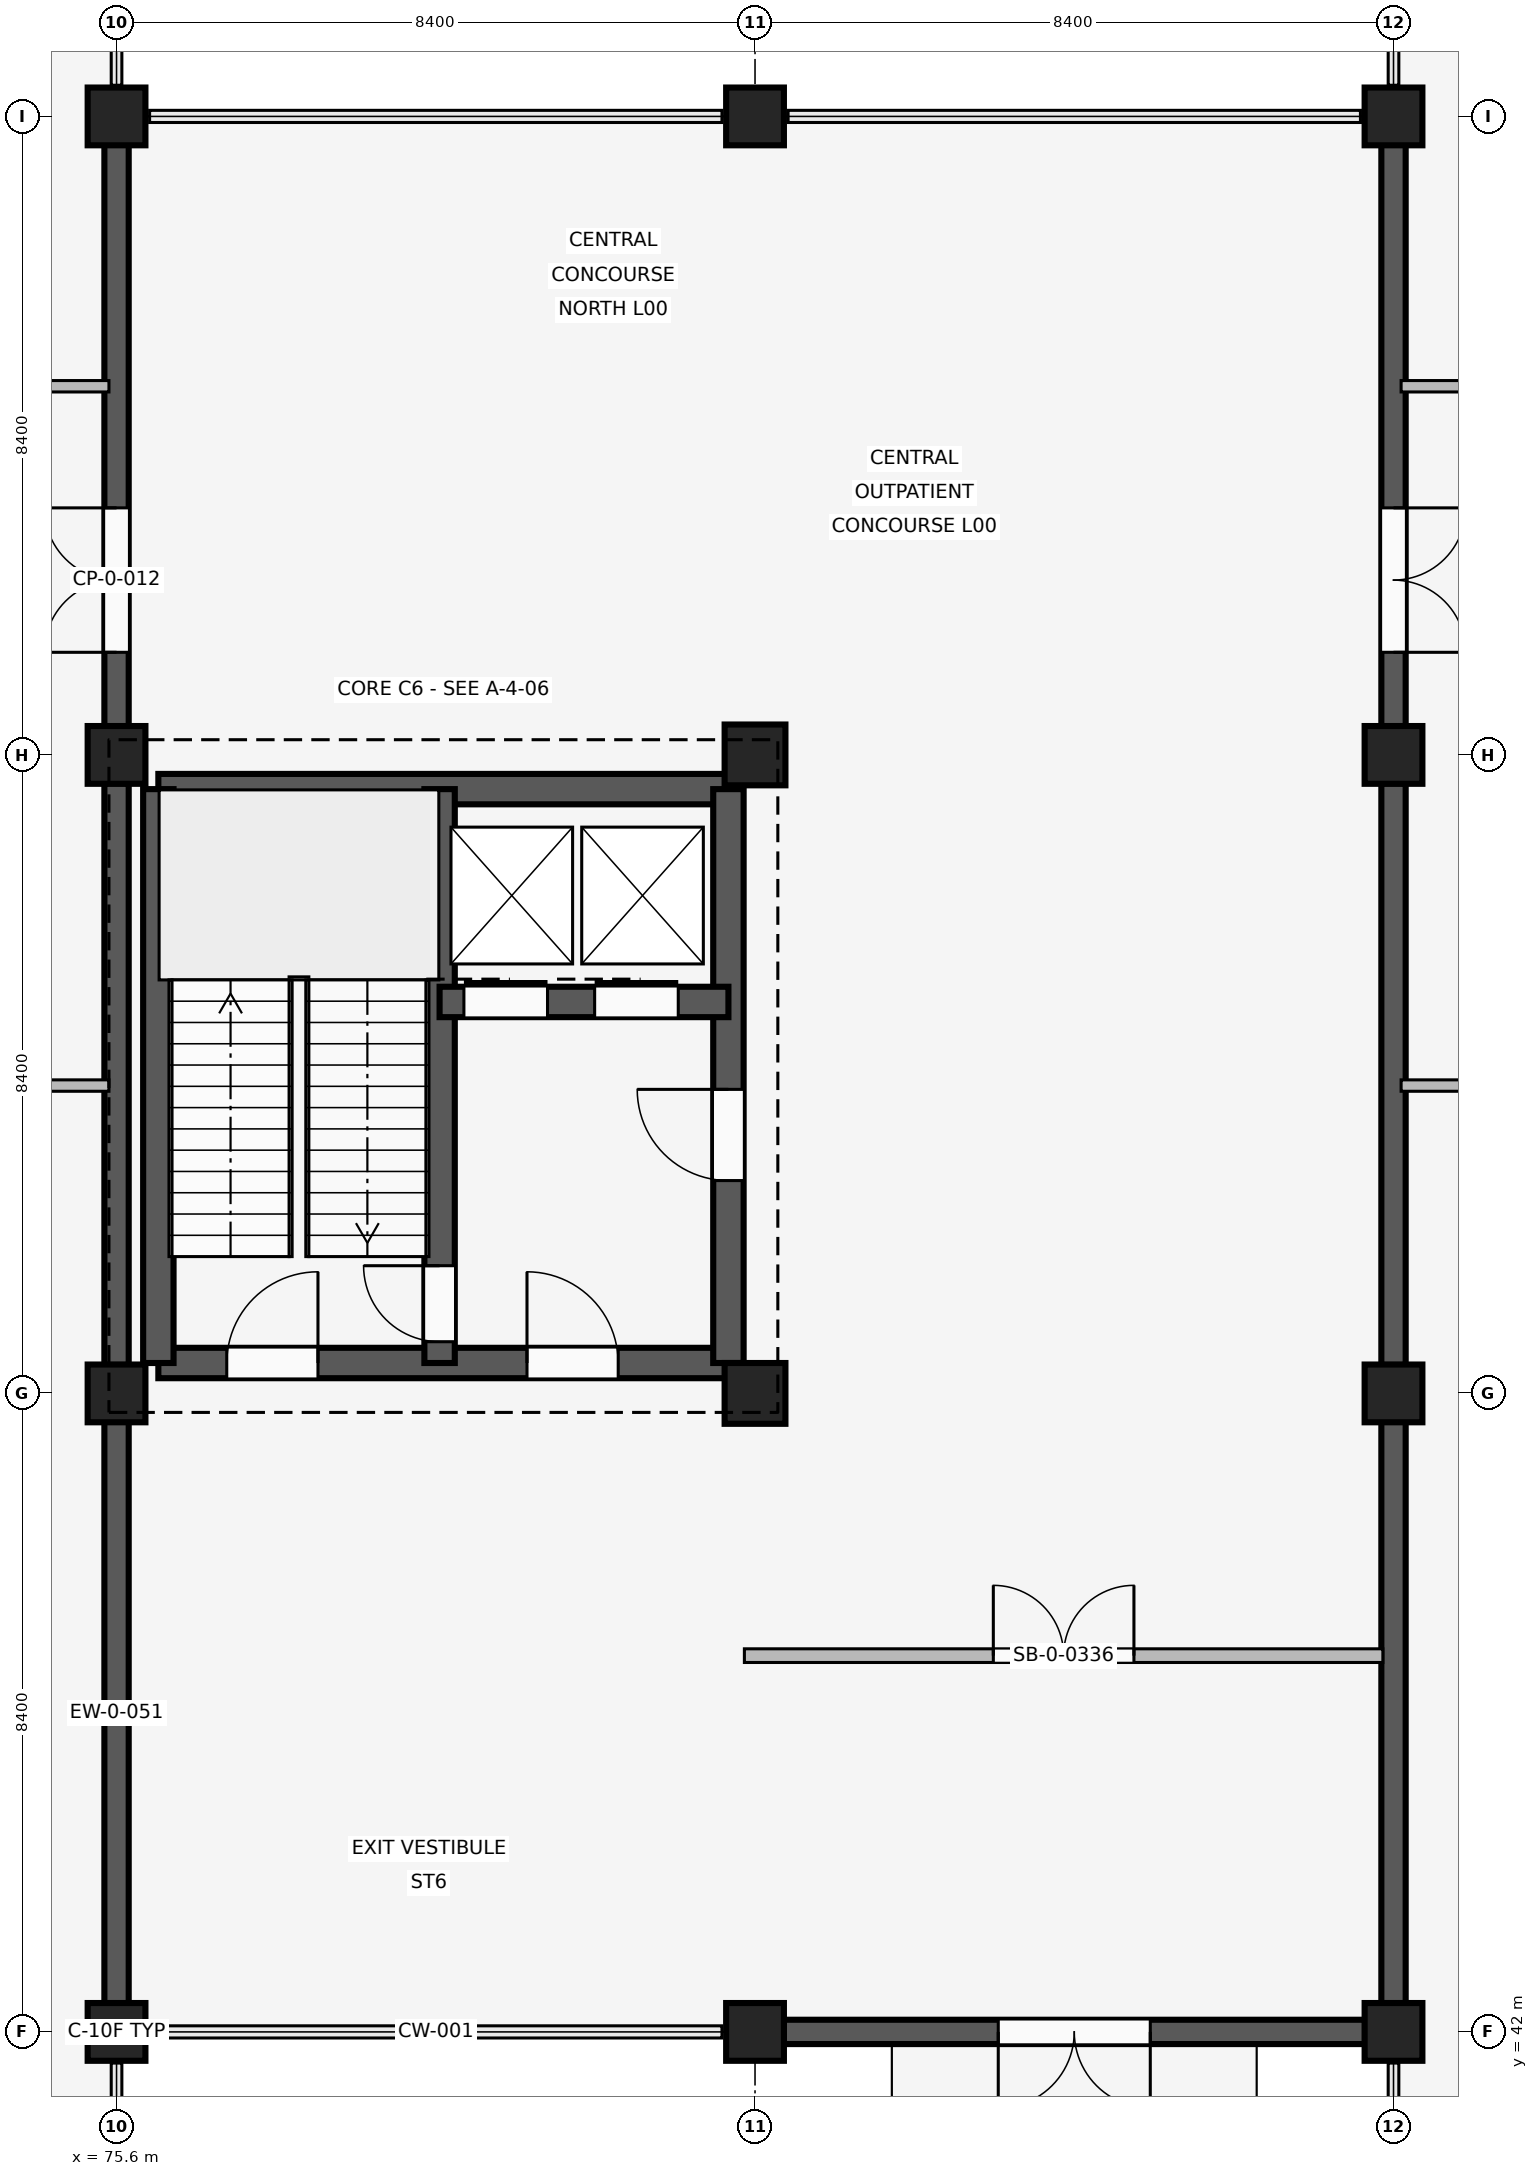
"""IFC4 building model, lengths in metres.
Left out: names, types, materials, properties, quantities, classifications, styles, units other than length and angle.
Written with IfcOpenShell. Run it as: python <this file> out.ifc"""

import sys

from ifc_helpers import new_model, si_unit, direction, frame, frame_2d, origin, origin_2d, place, context, subcontext, project, spatial, rectangle, extrude, element, fill, save


model = new_model("IFC4")
c1 = context("Model", 3, precision=1e-05, world=origin(), true_north=direction((0.0, 1.0)))
c2 = subcontext(c1, "Body", "Model", "MODEL_VIEW")
j1 = project(units=[si_unit("LENGTHUNIT", "METRE"), si_unit("PLANEANGLEUNIT", "RADIAN")], contexts=[c1])
p1 = place(None, origin())
s1 = spatial("IfcSite", under=j1, at=p1, CompositionType="ELEMENT")
p2 = place(p1, origin())
s2 = spatial("IfcBuilding", under=s1, at=p2, CompositionType="ELEMENT")
p3 = place(p2, origin())
s3 = spatial("IfcBuildingStorey", under=s2, at=p3, CompositionType="ELEMENT", Elevation=0.0)
for number, where, z_axis, x_axis in (
    (1, (75.6, 42.0, 0.0), (0.0, 0.0, 1.0), (1.0, 0.0, 0.0)),
    (2, (75.6, 50.4, 0.0), (0.0, 0.0, 1.0), (1.0, 0.0, 0.0)),
    (3, (75.6, 58.8, 0.0), (0.0, 0.0, 1.0), (1.0, 0.0, 0.0)),
    (4, (75.6, 67.2, 0.0), (0.0, 0.0, 1.0), (1.0, 0.0, 0.0)),
    (5, (84.0, 42.0, 0.0), (0.0, 0.0, 1.0), (1.0, 0.0, 0.0)),
):
    element("IfcColumn", number, at=place(p3, frame(where, z_axis=z_axis, x_axis=x_axis)), inside=s3, PredefinedType="COLUMN", context=c2, shape_type="SweptSolid", body=[
        extrude(rectangle(XDim=0.76, YDim=0.76, at=origin_2d()), origin(), (0.0, 0.0, 1.0), 4.8),
    ])
for number, where, z_axis, x_axis in (
    (6, (84.0, 50.4, 0.0), (0.0, 0.0, 1.0), (1.0, 0.0, 0.0)),
    (7, (84.0, 58.8, 0.0), (0.0, 0.0, 1.0), (1.0, 0.0, 0.0)),
):
    element("IfcColumn", number, at=place(p3, frame(where, z_axis=z_axis, x_axis=x_axis)), inside=s3, PredefinedType="COLUMN", context=c2, shape_type="SweptSolid", body=[
        extrude(rectangle(XDim=0.8, YDim=0.8, at=origin_2d()), origin(), (0.0, 0.0, 1.0), 4.8),
    ])
for number, where, z_axis, x_axis in (
    (8, (84.0, 67.2, 0.0), (0.0, 0.0, 1.0), (1.0, 0.0, 0.0)),
    (9, (92.4, 42.0, 0.0), (0.0, 0.0, 1.0), (1.0, 0.0, 0.0)),
    (10, (92.4, 50.4, 0.0), (0.0, 0.0, 1.0), (1.0, 0.0, 0.0)),
    (11, (92.4, 58.8, 0.0), (0.0, 0.0, 1.0), (1.0, 0.0, 0.0)),
    (12, (92.4, 67.2, 0.0), (0.0, 0.0, 1.0), (1.0, 0.0, 0.0)),
):
    element("IfcColumn", number, at=place(p3, frame(where, z_axis=z_axis, x_axis=x_axis)), inside=s3, PredefinedType="COLUMN", context=c2, shape_type="SweptSolid", body=[
        extrude(rectangle(XDim=0.76, YDim=0.76, at=origin_2d()), origin(), (0.0, 0.0, 1.0), 4.8),
    ])
p4 = place(p3, frame((75.6, 42.375, 0.0), z_axis=(0.0, 0.0, 1.0), x_axis=(0.0, 1.0, 0.0)))
e13 = element("IfcWall", 13, at=p4, inside=s3, PredefinedType="SOLIDWALL", context=c2, shape_type="SweptSolid", body=[
    extrude(rectangle(XDim=7.65, YDim=0.32, at=frame_2d((3.825, 0.0))), origin(), (0.0, 0.0, 1.0), 3.82),
])
p5 = place(p3, frame((75.6, 50.775, 0.0), z_axis=(0.0, 0.0, 1.0), x_axis=(0.0, 1.0, 0.0)))
e14 = element("IfcWall", 14, at=p5, inside=s3, PredefinedType="SOLIDWALL", context=c2, shape_type="SweptSolid", body=[
    extrude(rectangle(XDim=7.65, YDim=0.32, at=frame_2d((3.825, 0.0))), origin(), (0.0, 0.0, 1.0), 3.82),
])
p6 = place(p3, frame((75.6, 59.175, 0.0), z_axis=(0.0, 0.0, 1.0), x_axis=(0.0, 1.0, 0.0)))
e15 = element("IfcWall", 15, at=p6, inside=s3, PredefinedType="SOLIDWALL", context=c2, shape_type="SweptSolid", body=[
    extrude(rectangle(XDim=7.65, YDim=0.32, at=frame_2d((3.825, 0.0))), origin(), (0.0, 0.0, 1.0), 3.82),
])
p7 = place(p6, frame((0.975, 0.0, 0.0)))
e16 = element("IfcOpeningElement", 16, at=p7, cuts=e15, PredefinedType="OPENING", context=c2, shape_type="SweptSolid", body=[
    extrude(rectangle(XDim=1.9, YDim=2.4, at=frame_2d((0.95, 1.2))), frame((0.0, 0.17, 0.0), z_axis=(0.0, -1.0, 0.0), x_axis=(1.0, 0.0, 0.0)), (0.0, 0.0, 1.0), 0.34),
])
p8 = place(p3, frame((92.025, 42.0, 0.0), z_axis=(0.0, 0.0, 1.0), x_axis=(-1.0, 0.0, 0.0)))
e17 = element("IfcWall", 17, at=p8, inside=s3, PredefinedType="SOLIDWALL", context=c2, shape_type="SweptSolid", body=[
    extrude(rectangle(XDim=7.65, YDim=0.32, at=frame_2d((3.825, 0.0))), origin(), (0.0, 0.0, 1.0), 3.82),
])
p9 = place(p8, frame((2.825, 0.0, 0.0)))
e18 = element("IfcOpeningElement", 18, at=p9, cuts=e17, PredefinedType="OPENING", context=c2, shape_type="SweptSolid", body=[
    extrude(rectangle(XDim=2.0, YDim=2.4, at=frame_2d((1.0, 1.2))), frame((0.0, 0.17, 0.0), z_axis=(0.0, -1.0, 0.0), x_axis=(1.0, 0.0, 0.0)), (0.0, 0.0, 1.0), 0.34),
])
p10 = place(p3, frame((92.4, 50.025, 0.0), z_axis=(0.0, 0.0, 1.0), x_axis=(0.0, -1.0, 0.0)))
e19 = element("IfcWall", 19, at=p10, inside=s3, PredefinedType="SOLIDWALL", context=c2, shape_type="SweptSolid", body=[
    extrude(rectangle(XDim=7.65, YDim=0.32, at=frame_2d((3.825, 0.0))), origin(), (0.0, 0.0, 1.0), 3.82),
])
p11 = place(p3, frame((92.4, 58.425, 0.0), z_axis=(0.0, 0.0, 1.0), x_axis=(0.0, -1.0, 0.0)))
e20 = element("IfcWall", 20, at=p11, inside=s3, PredefinedType="SOLIDWALL", context=c2, shape_type="SweptSolid", body=[
    extrude(rectangle(XDim=7.65, YDim=0.32, at=frame_2d((3.825, 0.0))), origin(), (0.0, 0.0, 1.0), 3.82),
])
p12 = place(p3, frame((92.4, 66.825, 0.0), z_axis=(0.0, 0.0, 1.0), x_axis=(0.0, -1.0, 0.0)))
e21 = element("IfcWall", 21, at=p12, inside=s3, PredefinedType="SOLIDWALL", context=c2, shape_type="SweptSolid", body=[
    extrude(rectangle(XDim=7.65, YDim=0.32, at=frame_2d((3.825, 0.0))), origin(), (0.0, 0.0, 1.0), 3.82),
])
p13 = place(p12, frame((4.775, 0.0, 0.0)))
e22 = element("IfcOpeningElement", 22, at=p13, cuts=e21, PredefinedType="OPENING", context=c2, shape_type="SweptSolid", body=[
    extrude(rectangle(XDim=1.9, YDim=2.4, at=frame_2d((0.95, 1.2))), frame((0.0, 0.17, 0.0), z_axis=(0.0, -1.0, 0.0), x_axis=(1.0, 0.0, 0.0)), (0.0, 0.0, 1.0), 0.34),
])
p14 = place(p3, frame((76.15, 50.8, 0.0), z_axis=(0.0, 0.0, 1.0), x_axis=(1.0, 0.0, 0.0)))
e23 = element("IfcWall", 23, at=p14, inside=s3, PredefinedType="SHEAR", context=c2, shape_type="SweptSolid", body=[
    extrude(rectangle(XDim=7.5, YDim=0.4, at=frame_2d((3.75, 0.0))), origin(), (0.0, 0.0, 1.0), 4.52),
])
p15 = place(p14, frame((4.85, 0.0, 0.0)))
e24 = element("IfcOpeningElement", 24, at=p15, cuts=e23, PredefinedType="OPENING", context=c2, shape_type="SweptSolid", body=[
    extrude(rectangle(XDim=1.2, YDim=2.2, at=frame_2d((0.6, 1.1))), frame((0.0, 0.21, 0.0), z_axis=(0.0, -1.0, 0.0), x_axis=(1.0, 0.0, 0.0)), (0.0, 0.0, 1.0), 0.42),
])
p16 = place(p14, frame((0.9, 0.0, 0.0)))
e25 = element("IfcOpeningElement", 25, at=p16, cuts=e23, PredefinedType="OPENING", context=c2, shape_type="SweptSolid", body=[
    extrude(rectangle(XDim=1.2, YDim=2.2, at=frame_2d((0.6, 1.1))), frame((0.0, 0.21, 0.0), z_axis=(0.0, -1.0, 0.0), x_axis=(1.0, 0.0, 0.0)), (0.0, 0.0, 1.0), 0.42),
])
p17 = place(p3, frame((76.15, 58.35, 0.0), z_axis=(0.0, 0.0, 1.0), x_axis=(1.0, 0.0, 0.0)))
e26 = element("IfcWall", 26, at=p17, inside=s3, PredefinedType="SHEAR", context=c2, shape_type="SweptSolid", body=[
    extrude(rectangle(XDim=7.5, YDim=0.4, at=frame_2d((3.75, 0.0))), origin(), (0.0, 0.0, 1.0), 4.52),
])
p18 = place(p3, frame((76.15, 50.8, 0.0), z_axis=(0.0, 0.0, 1.0), x_axis=(0.0, 1.0, 0.0)))
e27 = element("IfcWall", 27, at=p18, inside=s3, PredefinedType="SHEAR", context=c2, shape_type="SweptSolid", body=[
    extrude(rectangle(XDim=7.55, YDim=0.4, at=frame_2d((3.775, 0.0))), origin(), (0.0, 0.0, 1.0), 4.52),
])
p19 = place(p3, frame((83.65, 50.8, 0.0), z_axis=(0.0, 0.0, 1.0), x_axis=(0.0, 1.0, 0.0)))
e28 = element("IfcWall", 28, at=p19, inside=s3, PredefinedType="SHEAR", context=c2, shape_type="SweptSolid", body=[
    extrude(rectangle(XDim=7.55, YDim=0.4, at=frame_2d((3.775, 0.0))), origin(), (0.0, 0.0, 1.0), 4.52),
])
p20 = place(p19, frame((2.4, 0.0, 0.0)))
e29 = element("IfcOpeningElement", 29, at=p20, cuts=e28, PredefinedType="OPENING", context=c2, shape_type="SweptSolid", body=[
    extrude(rectangle(XDim=1.2, YDim=2.2, at=frame_2d((0.6, 1.1))), frame((0.0, 0.21, 0.0), z_axis=(0.0, -1.0, 0.0), x_axis=(1.0, 0.0, 0.0)), (0.0, 0.0, 1.0), 0.42),
])
p21 = place(p3, frame((79.85, 50.8, 0.0), z_axis=(0.0, 0.0, 1.0), x_axis=(0.0, 1.0, 0.0)))
e30 = element("IfcWall", 30, at=p21, inside=s3, PredefinedType="SHEAR", context=c2, shape_type="SweptSolid", body=[
    extrude(rectangle(XDim=7.55, YDim=0.4, at=frame_2d((3.775, 0.0))), origin(), (0.0, 0.0, 1.0), 4.52),
])
p22 = place(p21, frame((0.28, 0.0, 0.0)))
e31 = element("IfcOpeningElement", 31, at=p22, cuts=e30, PredefinedType="OPENING", context=c2, shape_type="SweptSolid", body=[
    extrude(rectangle(XDim=1.0, YDim=2.15, at=frame_2d((0.5, 1.075))), frame((0.0, 0.21, 0.0), z_axis=(0.0, -1.0, 0.0), x_axis=(1.0, 0.0, 0.0)), (0.0, 0.0, 1.0), 0.42),
])
p23 = place(p3, frame((79.85, 55.55, 0.0), z_axis=(0.0, 0.0, 1.0), x_axis=(1.0, 0.0, 0.0)))
e32 = element("IfcWall", 32, at=p23, inside=s3, PredefinedType="SHEAR", context=c2, shape_type="SweptSolid", body=[
    extrude(rectangle(XDim=3.8, YDim=0.4, at=frame_2d((1.9, 0.0))), origin(), (0.0, 0.0, 1.0), 4.52),
])
p24 = place(p23, frame((0.32, 0.0, 0.0)))
e33 = element("IfcOpeningElement", 33, at=p24, cuts=e32, PredefinedType="OPENING", context=c2, shape_type="SweptSolid", body=[
    extrude(rectangle(XDim=1.1, YDim=2.15, at=frame_2d((0.55, 1.075))), frame((0.0, 0.21, 0.0), z_axis=(0.0, -1.0, 0.0), x_axis=(1.0, 0.0, 0.0)), (0.0, 0.0, 1.0), 0.42),
])
p25 = place(p23, frame((2.04, 0.0, 0.0)))
e34 = element("IfcOpeningElement", 34, at=p25, cuts=e32, PredefinedType="OPENING", context=c2, shape_type="SweptSolid", body=[
    extrude(rectangle(XDim=1.1, YDim=2.15, at=frame_2d((0.55, 1.075))), frame((0.0, 0.21, 0.0), z_axis=(0.0, -1.0, 0.0), x_axis=(1.0, 0.0, 0.0)), (0.0, 0.0, 1.0), 0.42),
])
p26 = place(p3, frame((83.86, 46.95, 0.0), z_axis=(0.0, 0.0, 1.0), x_axis=(1.0, 0.0, 0.0)))
e35 = element("IfcWall", 35, at=p26, inside=s3, PredefinedType="PARTITIONING", context=c2, shape_type="SweptSolid", body=[
    extrude(rectangle(XDim=8.4, YDim=0.18, at=frame_2d((4.2, 0.0))), origin(), (0.0, 0.0, 1.0), 3.8),
])
p27 = place(p26, frame((3.275, 0.0, 0.0)))
e36 = element("IfcOpeningElement", 36, at=p27, cuts=e35, PredefinedType="OPENING", context=c2, shape_type="SweptSolid", body=[
    extrude(rectangle(XDim=1.85, YDim=2.3, at=frame_2d((0.925, 1.15))), frame((0.0, 0.1, 0.0), z_axis=(0.0, -1.0, 0.0), x_axis=(1.0, 0.0, 0.0)), (0.0, 0.0, 1.0), 0.2),
])
p28 = place(p3, frame((46.9, 54.45, 0.0), z_axis=(0.0, 0.0, 1.0), x_axis=(1.0, 0.0, 0.0)))
e37 = element("IfcWall", 37, at=p28, inside=s3, PredefinedType="PARTITIONING", context=c2, shape_type="SweptSolid", body=[
    extrude(rectangle(XDim=28.6, YDim=0.15, at=frame_2d((14.3, 0.0))), origin(), (0.0, 0.0, 1.0), 4.09),
])
p29 = place(p28, frame((2.6, 0.0, 0.0)))
e38 = element("IfcOpeningElement", 38, at=p29, cuts=e37, PredefinedType="OPENING", context=c2, shape_type="SweptSolid", body=[
    extrude(rectangle(XDim=1.0, YDim=2.15, at=frame_2d((0.5, 1.075))), frame((0.0, 0.085, 0.0), z_axis=(0.0, -1.0, 0.0), x_axis=(1.0, 0.0, 0.0)), (0.0, 0.0, 1.0), 0.17),
])
p30 = place(p3, frame((46.9, 63.65, 0.0), z_axis=(0.0, 0.0, 1.0), x_axis=(1.0, 0.0, 0.0)))
e39 = element("IfcWall", 39, at=p30, inside=s3, PredefinedType="PARTITIONING", context=c2, shape_type="SweptSolid", body=[
    extrude(rectangle(XDim=28.6, YDim=0.15, at=frame_2d((14.3, 0.0))), origin(), (0.0, 0.0, 1.0), 4.09),
])
p31 = place(p30, frame((2.6, 0.0, 0.0)))
e40 = element("IfcOpeningElement", 40, at=p31, cuts=e39, PredefinedType="OPENING", context=c2, shape_type="SweptSolid", body=[
    extrude(rectangle(XDim=1.05, YDim=2.2, at=frame_2d((0.525, 1.1))), frame((0.0, 0.085, 0.0), z_axis=(0.0, -1.0, 0.0), x_axis=(1.0, 0.0, 0.0)), (0.0, 0.0, 1.0), 0.17),
])
p32 = place(p3, frame((92.5, 54.45, 0.0), z_axis=(0.0, 0.0, 1.0), x_axis=(1.0, 0.0, 0.0)))
e41 = element("IfcWall", 41, at=p32, inside=s3, PredefinedType="PARTITIONING", context=c2, shape_type="SweptSolid", body=[
    extrude(rectangle(XDim=28.6, YDim=0.15, at=frame_2d((14.3, 0.0))), origin(), (0.0, 0.0, 1.0), 4.09),
])
p33 = place(p32, frame((2.6, 0.0, 0.0)))
e42 = element("IfcOpeningElement", 42, at=p33, cuts=e41, PredefinedType="OPENING", context=c2, shape_type="SweptSolid", body=[
    extrude(rectangle(XDim=1.0, YDim=2.15, at=frame_2d((0.5, 1.075))), frame((0.0, 0.085, 0.0), z_axis=(0.0, -1.0, 0.0), x_axis=(1.0, 0.0, 0.0)), (0.0, 0.0, 1.0), 0.17),
])
p34 = place(p3, frame((92.5, 63.65, 0.0), z_axis=(0.0, 0.0, 1.0), x_axis=(1.0, 0.0, 0.0)))
e43 = element("IfcWall", 43, at=p34, inside=s3, PredefinedType="PARTITIONING", context=c2, shape_type="SweptSolid", body=[
    extrude(rectangle(XDim=28.6, YDim=0.15, at=frame_2d((14.3, 0.0))), origin(), (0.0, 0.0, 1.0), 4.09),
])
p35 = place(p34, frame((2.6, 0.0, 0.0)))
e44 = element("IfcOpeningElement", 44, at=p35, cuts=e43, PredefinedType="OPENING", context=c2, shape_type="SweptSolid", body=[
    extrude(rectangle(XDim=1.05, YDim=2.2, at=frame_2d((0.525, 1.1))), frame((0.0, 0.085, 0.0), z_axis=(0.0, -1.0, 0.0), x_axis=(1.0, 0.0, 0.0)), (0.0, 0.0, 1.0), 0.17),
])
p36 = place(p7, origin())
e45 = element("IfcDoor", 45, at=p36, inside=s3, OperationType="DOUBLE_SWING_LEFT", PredefinedType="DOOR", context=c2, shape_type="SweptSolid", body=[
    extrude(rectangle(XDim=1.9, YDim=2.4, at=frame_2d((0.95, 1.2))), frame((0.0, 0.025, 0.0), z_axis=(0.0, -1.0, 0.0), x_axis=(1.0, 0.0, 0.0)), (0.0, 0.0, 1.0), 0.05),
])
fill(e16, e45)
p37 = place(p9, origin())
e46 = element("IfcDoor", 46, at=p37, inside=s3, OperationType="DOUBLE_SWING_LEFT", PredefinedType="DOOR", context=c2, shape_type="SweptSolid", body=[
    extrude(rectangle(XDim=2.0, YDim=2.4, at=frame_2d((1.0, 1.2))), frame((0.0, 0.025, 0.0), z_axis=(0.0, -1.0, 0.0), x_axis=(1.0, 0.0, 0.0)), (0.0, 0.0, 1.0), 0.05),
])
fill(e18, e46)
p38 = place(p13, origin())
e47 = element("IfcDoor", 47, at=p38, inside=s3, OperationType="DOUBLE_SWING_LEFT", PredefinedType="DOOR", context=c2, shape_type="SweptSolid", body=[
    extrude(rectangle(XDim=1.9, YDim=2.4, at=frame_2d((0.95, 1.2))), frame((0.0, 0.025, 0.0), z_axis=(0.0, -1.0, 0.0), x_axis=(1.0, 0.0, 0.0)), (0.0, 0.0, 1.0), 0.05),
])
fill(e22, e47)
p39 = place(p20, origin())
e48 = element("IfcDoor", 48, at=p39, inside=s3, OperationType="SINGLE_SWING_RIGHT", PredefinedType="DOOR", context=c2, shape_type="SweptSolid", body=[
    extrude(rectangle(XDim=1.2, YDim=2.2, at=frame_2d((0.6, 1.1))), frame((0.0, 0.025, 0.0), z_axis=(0.0, -1.0, 0.0), x_axis=(1.0, 0.0, 0.0)), (0.0, 0.0, 1.0), 0.05),
])
fill(e29, e48)
p40 = place(p15, origin())
e49 = element("IfcDoor", 49, at=p40, inside=s3, OperationType="SINGLE_SWING_LEFT", PredefinedType="DOOR", context=c2, shape_type="SweptSolid", body=[
    extrude(rectangle(XDim=1.2, YDim=2.2, at=frame_2d((0.6, 1.1))), frame((0.0, 0.025, 0.0), z_axis=(0.0, -1.0, 0.0), x_axis=(1.0, 0.0, 0.0)), (0.0, 0.0, 1.0), 0.05),
])
fill(e24, e49)
p41 = place(p22, origin())
e50 = element("IfcDoor", 50, at=p41, inside=s3, OperationType="SINGLE_SWING_RIGHT", PredefinedType="DOOR", context=c2, shape_type="SweptSolid", body=[
    extrude(rectangle(XDim=1.0, YDim=2.15, at=frame_2d((0.5, 1.075))), frame((0.0, 0.025, 0.0), z_axis=(0.0, -1.0, 0.0), x_axis=(1.0, 0.0, 0.0)), (0.0, 0.0, 1.0), 0.05),
])
fill(e31, e50)
p42 = place(p16, origin())
e51 = element("IfcDoor", 51, at=p42, inside=s3, OperationType="SINGLE_SWING_RIGHT", PredefinedType="DOOR", context=c2, shape_type="SweptSolid", body=[
    extrude(rectangle(XDim=1.2, YDim=2.2, at=frame_2d((0.6, 1.1))), frame((0.0, 0.025, 0.0), z_axis=(0.0, -1.0, 0.0), x_axis=(1.0, 0.0, 0.0)), (0.0, 0.0, 1.0), 0.05),
])
fill(e25, e51)
p43 = place(p24, origin())
e52 = element("IfcDoor", 52, at=p43, inside=s3, OperationType="SLIDING_TO_LEFT", PredefinedType="DOOR", context=c2, shape_type="SweptSolid", body=[
    extrude(rectangle(XDim=1.1, YDim=2.15, at=frame_2d((0.55, 1.075))), frame((0.0, 0.025, 0.0), z_axis=(0.0, -1.0, 0.0), x_axis=(1.0, 0.0, 0.0)), (0.0, 0.0, 1.0), 0.05),
])
fill(e33, e52)
p44 = place(p25, origin())
e53 = element("IfcDoor", 53, at=p44, inside=s3, OperationType="SLIDING_TO_LEFT", PredefinedType="DOOR", context=c2, shape_type="SweptSolid", body=[
    extrude(rectangle(XDim=1.1, YDim=2.15, at=frame_2d((0.55, 1.075))), frame((0.0, 0.025, 0.0), z_axis=(0.0, -1.0, 0.0), x_axis=(1.0, 0.0, 0.0)), (0.0, 0.0, 1.0), 0.05),
])
fill(e34, e53)
p45 = place(p27, origin())
e54 = element("IfcDoor", 54, at=p45, inside=s3, OperationType="DOUBLE_SWING_LEFT", PredefinedType="DOOR", context=c2, shape_type="SweptSolid", body=[
    extrude(rectangle(XDim=1.85, YDim=2.3, at=frame_2d((0.925, 1.15))), frame((0.0, 0.025, 0.0), z_axis=(0.0, -1.0, 0.0), x_axis=(1.0, 0.0, 0.0)), (0.0, 0.0, 1.0), 0.05),
])
fill(e36, e54)
save(model, sys.argv[1])
